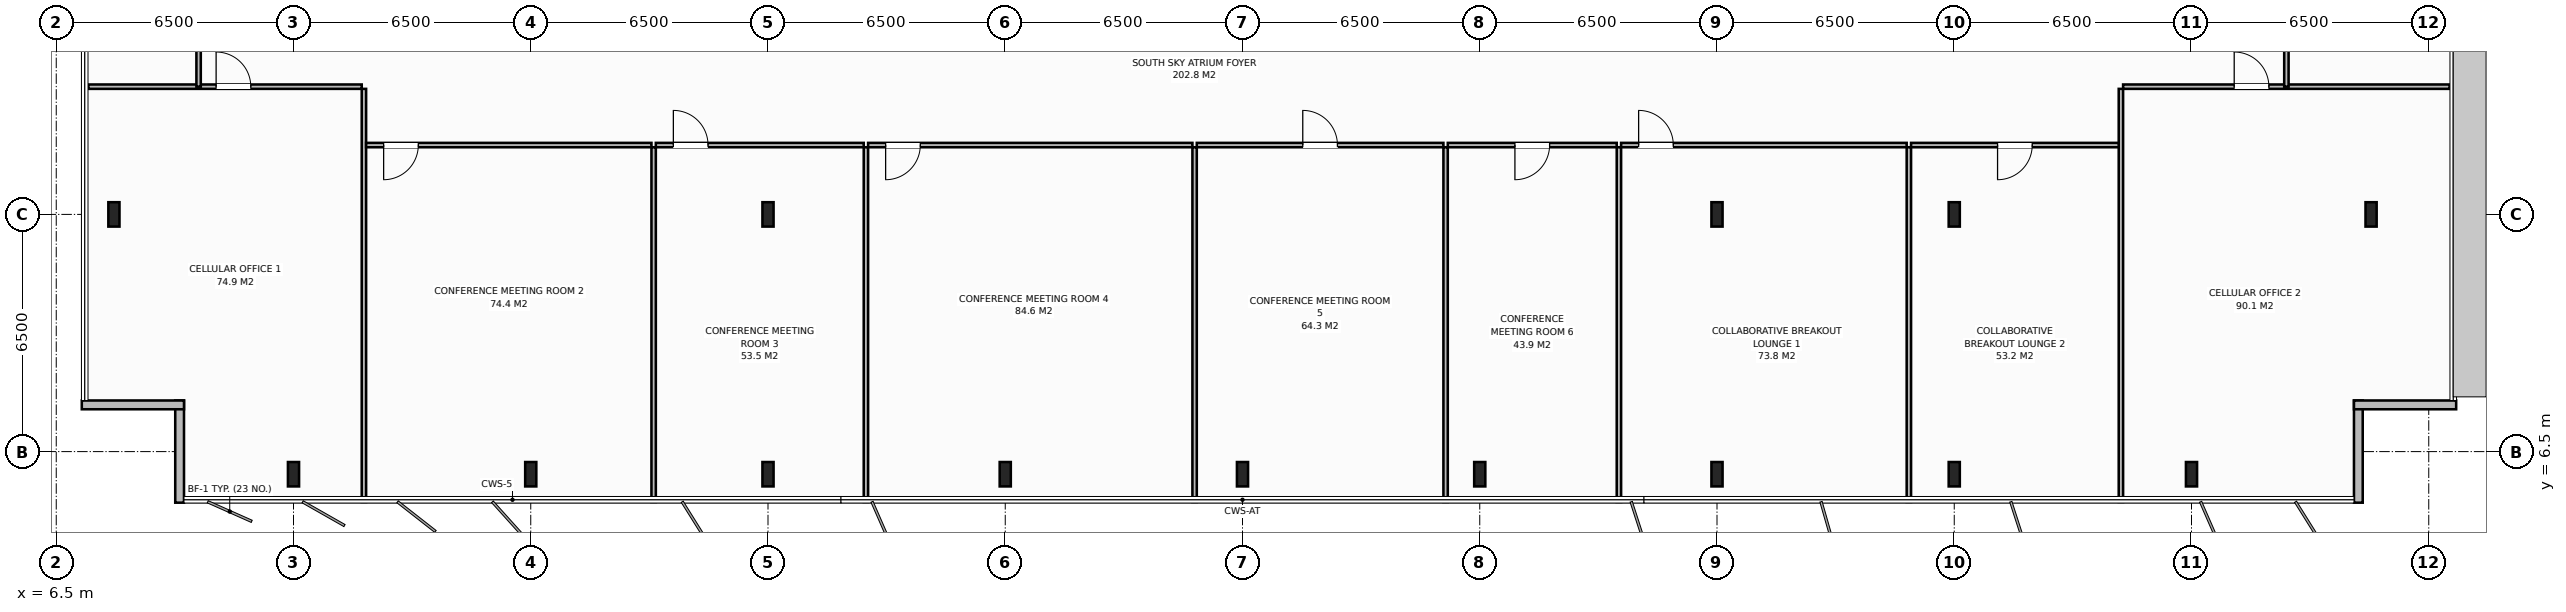
"""IFC4 building model, lengths in metres.
Left out: names, types, materials, properties, quantities, classifications, styles, units other than length and angle.
Written with IfcOpenShell. Run it as: python <this file> out.ifc"""

import sys

from ifc_helpers import new_model, si_unit, direction, frame, frame_2d, origin, origin_2d, place, context, subcontext, project, spatial, rectangle, i_section, extrude, element, fill, save


model = new_model("IFC4")
c1 = context("Model", 3, precision=1e-05, world=origin(), true_north=direction((0.0, 1.0)))
c2 = subcontext(c1, "Body", "Model", "MODEL_VIEW")
j1 = project(units=[si_unit("LENGTHUNIT", "METRE"), si_unit("PLANEANGLEUNIT", "RADIAN")], contexts=[c1])
p1 = place(None, origin())
s1 = spatial("IfcSite", under=j1, at=p1, CompositionType="ELEMENT")
p2 = place(p1, origin())
s2 = spatial("IfcBuilding", under=s1, at=p2, CompositionType="ELEMENT")
p3 = place(p2, frame((0.0, 0.0, 278.4)))
s3 = spatial("IfcBuildingStorey", under=s2, at=p3, CompositionType="ELEMENT", Elevation=278.4)
for number, where, z_axis, x_axis in (
    (1, (58.5, 13.0, 0.0), (0.0, 0.0, 1.0), (1.0, 0.0, 0.0)),
    (2, (26.0, 13.0, 0.0), (0.0, 0.0, 1.0), (1.0, 0.0, 0.0)),
    (3, (52.0, 13.0, 0.0), (0.0, 0.0, 1.0), (1.0, 0.0, 0.0)),
    (4, (13.0, 5.88, 0.0), (0.0, 0.0, 1.0), (1.0, 0.0, 0.0)),
    (5, (19.5, 5.88, 0.0), (0.0, 0.0, 1.0), (1.0, 0.0, 0.0)),
    (6, (26.0, 5.88, 0.0), (0.0, 0.0, 1.0), (1.0, 0.0, 0.0)),
    (7, (32.5, 5.88, 0.0), (0.0, 0.0, 1.0), (1.0, 0.0, 0.0)),
    (8, (39.0, 5.88, 0.0), (0.0, 0.0, 1.0), (1.0, 0.0, 0.0)),
    (9, (45.5, 5.88, 0.0), (0.0, 0.0, 1.0), (1.0, 0.0, 0.0)),
    (10, (52.0, 5.88, 0.0), (0.0, 0.0, 1.0), (1.0, 0.0, 0.0)),
    (11, (58.5, 5.88, 0.0), (0.0, 0.0, 1.0), (1.0, 0.0, 0.0)),
    (12, (65.0, 5.88, 0.0), (0.0, 0.0, 1.0), (1.0, 0.0, 0.0)),
    (13, (8.08, 13.0, 0.0), (0.0, 0.0, 1.0), (1.0, 0.0, 0.0)),
    (14, (69.92, 13.0, 0.0), (0.0, 0.0, 1.0), (1.0, 0.0, 0.0)),
):
    element("IfcColumn", number, at=place(p3, frame(where, z_axis=z_axis, x_axis=x_axis)), inside=s3, PredefinedType="COLUMN", context=c2, shape_type="SweptSolid", body=[
        extrude(i_section(OverallWidth=0.305, OverallDepth=0.668, WebThickness=0.021, FlangeThickness=0.04, at=origin_2d()), origin(), (0.0, 0.0, 1.0), 4.0),
    ])
p4 = place(p3, frame((9.88, 5.1, 0.0), z_axis=(0.0, 0.0, 1.0), x_axis=(0.0, 1.0, 0.0)))
e15 = element("IfcWall", 15, at=p4, inside=s3, PredefinedType="STANDARD", context=c2, shape_type="SweptSolid", body=[
    extrude(rectangle(XDim=2.8, YDim=0.24, at=frame_2d((1.4, 0.0))), origin(), (0.0, 0.0, 1.0), 3.788),
])
p5 = place(p3, frame((10.0, 7.78, 0.0), z_axis=(0.0, 0.0, 1.0), x_axis=(-1.0, 0.0, 0.0)))
e16 = element("IfcWall", 16, at=p5, inside=s3, PredefinedType="STANDARD", context=c2, shape_type="SweptSolid", body=[
    extrude(rectangle(XDim=2.8, YDim=0.24, at=frame_2d((1.4, 0.0))), origin(), (0.0, 0.0, 1.0), 3.788),
])
p6 = place(p3, frame((69.571, 7.9, 0.0), z_axis=(0.0, 0.0, 1.0), x_axis=(0.0, -1.0, 0.0)))
e17 = element("IfcWall", 17, at=p6, inside=s3, PredefinedType="STANDARD", context=c2, shape_type="SweptSolid", body=[
    extrude(rectangle(XDim=2.8, YDim=0.24, at=frame_2d((1.4, 0.0))), origin(), (0.0, 0.0, 1.0), 3.788),
])
p7 = place(p3, frame((72.251, 7.78, 0.0), z_axis=(0.0, 0.0, 1.0), x_axis=(-1.0, 0.0, 0.0)))
e18 = element("IfcWall", 18, at=p7, inside=s3, PredefinedType="STANDARD", context=c2, shape_type="SweptSolid", body=[
    extrude(rectangle(XDim=2.8, YDim=0.24, at=frame_2d((1.4, 0.0))), origin(), (0.0, 0.0, 1.0), 3.788),
])
p8 = place(p3, frame((14.929, 5.12, 0.0), z_axis=(0.0, 0.0, 1.0), x_axis=(0.0, 1.0, 0.0)))
e19 = element("IfcWall", 19, at=p8, inside=s3, PredefinedType="PARTITIONING", context=c2, shape_type="SweptSolid", body=[
    extrude(rectangle(XDim=11.32, YDim=0.12, at=frame_2d((5.66, 0.0))), origin(), (0.0, 0.0, 1.0), 3.788),
])
p9 = place(p3, frame((7.38, 16.5, 0.0), z_axis=(0.0, 0.0, 1.0), x_axis=(1.0, 0.0, 0.0)))
e20 = element("IfcWall", 20, at=p9, inside=s3, PredefinedType="PARTITIONING", context=c2, shape_type="SweptSolid", body=[
    extrude(rectangle(XDim=7.49, YDim=0.12, at=frame_2d((3.745, 0.0))), origin(), (0.0, 0.0, 1.0), 3.788),
])
p10 = place(p9, frame((3.5, 0.0, 0.0)))
e21 = element("IfcOpeningElement", 21, at=p10, cuts=e20, PredefinedType="OPENING", context=c2, shape_type="SweptSolid", body=[
    extrude(rectangle(XDim=0.95, YDim=2.15, at=frame_2d((0.475, 1.075))), frame((0.0, 0.07, 0.0), z_axis=(0.0, -1.0, 0.0), x_axis=(1.0, 0.0, 0.0)), (0.0, 0.0, 1.0), 0.14),
])
p11 = place(p3, frame((22.867, 5.12, 0.0), z_axis=(0.0, 0.0, 1.0), x_axis=(0.0, 1.0, 0.0)))
e22 = element("IfcWall", 22, at=p11, inside=s3, PredefinedType="PARTITIONING", context=c2, shape_type="SweptSolid", body=[
    extrude(rectangle(XDim=9.72, YDim=0.12, at=frame_2d((4.86, 0.0))), origin(), (0.0, 0.0, 1.0), 3.788),
])
p12 = place(p3, frame((14.99, 14.9, 0.0), z_axis=(0.0, 0.0, 1.0), x_axis=(1.0, 0.0, 0.0)))
e23 = element("IfcWall", 23, at=p12, inside=s3, PredefinedType="PARTITIONING", context=c2, shape_type="SweptSolid", body=[
    extrude(rectangle(XDim=7.817, YDim=0.12, at=frame_2d((3.909, 0.0))), origin(), (0.0, 0.0, 1.0), 3.788),
])
p13 = place(p12, frame((0.48, 0.0, 0.0)))
e24 = element("IfcOpeningElement", 24, at=p13, cuts=e23, PredefinedType="OPENING", context=c2, shape_type="SweptSolid", body=[
    extrude(rectangle(XDim=0.95, YDim=2.15, at=frame_2d((0.475, 1.075))), frame((0.0, 0.07, 0.0), z_axis=(0.0, -1.0, 0.0), x_axis=(1.0, 0.0, 0.0)), (0.0, 0.0, 1.0), 0.14),
])
p14 = place(p3, frame((28.683, 5.12, 0.0), z_axis=(0.0, 0.0, 1.0), x_axis=(0.0, 1.0, 0.0)))
e25 = element("IfcWall", 25, at=p14, inside=s3, PredefinedType="PARTITIONING", context=c2, shape_type="SweptSolid", body=[
    extrude(rectangle(XDim=9.72, YDim=0.12, at=frame_2d((4.86, 0.0))), origin(), (0.0, 0.0, 1.0), 3.788),
])
p15 = place(p3, frame((22.927, 14.9, 0.0), z_axis=(0.0, 0.0, 1.0), x_axis=(1.0, 0.0, 0.0)))
e26 = element("IfcWall", 26, at=p15, inside=s3, PredefinedType="PARTITIONING", context=c2, shape_type="SweptSolid", body=[
    extrude(rectangle(XDim=5.696, YDim=0.12, at=frame_2d((2.848, 0.0))), origin(), (0.0, 0.0, 1.0), 3.788),
])
p16 = place(p15, frame((0.48, 0.0, 0.0)))
e27 = element("IfcOpeningElement", 27, at=p16, cuts=e26, PredefinedType="OPENING", context=c2, shape_type="SweptSolid", body=[
    extrude(rectangle(XDim=0.95, YDim=2.15, at=frame_2d((0.475, 1.075))), frame((0.0, 0.07, 0.0), z_axis=(0.0, -1.0, 0.0), x_axis=(1.0, 0.0, 0.0)), (0.0, 0.0, 1.0), 0.14),
])
p17 = place(p3, frame((37.688, 5.12, 0.0), z_axis=(0.0, 0.0, 1.0), x_axis=(0.0, 1.0, 0.0)))
e28 = element("IfcWall", 28, at=p17, inside=s3, PredefinedType="PARTITIONING", context=c2, shape_type="SweptSolid", body=[
    extrude(rectangle(XDim=9.72, YDim=0.12, at=frame_2d((4.86, 0.0))), origin(), (0.0, 0.0, 1.0), 3.788),
])
p18 = place(p3, frame((28.743, 14.9, 0.0), z_axis=(0.0, 0.0, 1.0), x_axis=(1.0, 0.0, 0.0)))
e29 = element("IfcWall", 29, at=p18, inside=s3, PredefinedType="PARTITIONING", context=c2, shape_type="SweptSolid", body=[
    extrude(rectangle(XDim=8.885, YDim=0.12, at=frame_2d((4.442, 0.0))), origin(), (0.0, 0.0, 1.0), 3.788),
])
p19 = place(p18, frame((0.48, 0.0, 0.0)))
e30 = element("IfcOpeningElement", 30, at=p19, cuts=e29, PredefinedType="OPENING", context=c2, shape_type="SweptSolid", body=[
    extrude(rectangle(XDim=0.95, YDim=2.15, at=frame_2d((0.475, 1.075))), frame((0.0, 0.07, 0.0), z_axis=(0.0, -1.0, 0.0), x_axis=(1.0, 0.0, 0.0)), (0.0, 0.0, 1.0), 0.14),
])
p20 = place(p3, frame((44.564, 5.12, 0.0), z_axis=(0.0, 0.0, 1.0), x_axis=(0.0, 1.0, 0.0)))
e31 = element("IfcWall", 31, at=p20, inside=s3, PredefinedType="PARTITIONING", context=c2, shape_type="SweptSolid", body=[
    extrude(rectangle(XDim=9.72, YDim=0.12, at=frame_2d((4.86, 0.0))), origin(), (0.0, 0.0, 1.0), 3.788),
])
p21 = place(p3, frame((37.748, 14.9, 0.0), z_axis=(0.0, 0.0, 1.0), x_axis=(1.0, 0.0, 0.0)))
e32 = element("IfcWall", 32, at=p21, inside=s3, PredefinedType="PARTITIONING", context=c2, shape_type="SweptSolid", body=[
    extrude(rectangle(XDim=6.757, YDim=0.12, at=frame_2d((3.378, 0.0))), origin(), (0.0, 0.0, 1.0), 3.788),
])
p22 = place(p21, frame((2.903, 0.0, 0.0)))
e33 = element("IfcOpeningElement", 33, at=p22, cuts=e32, PredefinedType="OPENING", context=c2, shape_type="SweptSolid", body=[
    extrude(rectangle(XDim=0.95, YDim=2.15, at=frame_2d((0.475, 1.075))), frame((0.0, 0.07, 0.0), z_axis=(0.0, -1.0, 0.0), x_axis=(1.0, 0.0, 0.0)), (0.0, 0.0, 1.0), 0.14),
])
p23 = place(p3, frame((49.313, 5.12, 0.0), z_axis=(0.0, 0.0, 1.0), x_axis=(0.0, 1.0, 0.0)))
e34 = element("IfcWall", 34, at=p23, inside=s3, PredefinedType="PARTITIONING", context=c2, shape_type="SweptSolid", body=[
    extrude(rectangle(XDim=9.72, YDim=0.12, at=frame_2d((4.86, 0.0))), origin(), (0.0, 0.0, 1.0), 3.788),
])
p24 = place(p3, frame((44.625, 14.9, 0.0), z_axis=(0.0, 0.0, 1.0), x_axis=(1.0, 0.0, 0.0)))
e35 = element("IfcWall", 35, at=p24, inside=s3, PredefinedType="PARTITIONING", context=c2, shape_type="SweptSolid", body=[
    extrude(rectangle(XDim=4.628, YDim=0.12, at=frame_2d((2.314, 0.0))), origin(), (0.0, 0.0, 1.0), 3.788),
])
p25 = place(p24, frame((1.839, 0.0, 0.0)))
e36 = element("IfcOpeningElement", 36, at=p25, cuts=e35, PredefinedType="OPENING", context=c2, shape_type="SweptSolid", body=[
    extrude(rectangle(XDim=0.95, YDim=2.15, at=frame_2d((0.475, 1.075))), frame((0.0, 0.07, 0.0), z_axis=(0.0, -1.0, 0.0), x_axis=(1.0, 0.0, 0.0)), (0.0, 0.0, 1.0), 0.14),
])
p26 = place(p3, frame((57.257, 5.12, 0.0), z_axis=(0.0, 0.0, 1.0), x_axis=(0.0, 1.0, 0.0)))
e37 = element("IfcWall", 37, at=p26, inside=s3, PredefinedType="PARTITIONING", context=c2, shape_type="SweptSolid", body=[
    extrude(rectangle(XDim=9.72, YDim=0.12, at=frame_2d((4.86, 0.0))), origin(), (0.0, 0.0, 1.0), 3.788),
])
p27 = place(p3, frame((49.373, 14.9, 0.0), z_axis=(0.0, 0.0, 1.0), x_axis=(1.0, 0.0, 0.0)))
e38 = element("IfcWall", 38, at=p27, inside=s3, PredefinedType="PARTITIONING", context=c2, shape_type="SweptSolid", body=[
    extrude(rectangle(XDim=7.824, YDim=0.12, at=frame_2d((3.912, 0.0))), origin(), (0.0, 0.0, 1.0), 3.788),
])
p28 = place(p27, frame((0.48, 0.0, 0.0)))
e39 = element("IfcOpeningElement", 39, at=p28, cuts=e38, PredefinedType="OPENING", context=c2, shape_type="SweptSolid", body=[
    extrude(rectangle(XDim=0.95, YDim=2.15, at=frame_2d((0.475, 1.075))), frame((0.0, 0.07, 0.0), z_axis=(0.0, -1.0, 0.0), x_axis=(1.0, 0.0, 0.0)), (0.0, 0.0, 1.0), 0.14),
])
p29 = place(p3, frame((63.066, 5.12, 0.0), z_axis=(0.0, 0.0, 1.0), x_axis=(0.0, 1.0, 0.0)))
e40 = element("IfcWall", 40, at=p29, inside=s3, PredefinedType="PARTITIONING", context=c2, shape_type="SweptSolid", body=[
    extrude(rectangle(XDim=11.32, YDim=0.12, at=frame_2d((5.66, 0.0))), origin(), (0.0, 0.0, 1.0), 3.788),
])
p30 = place(p3, frame((57.317, 14.9, 0.0), z_axis=(0.0, 0.0, 1.0), x_axis=(1.0, 0.0, 0.0)))
e41 = element("IfcWall", 41, at=p30, inside=s3, PredefinedType="PARTITIONING", context=c2, shape_type="SweptSolid", body=[
    extrude(rectangle(XDim=5.689, YDim=0.12, at=frame_2d((2.845, 0.0))), origin(), (0.0, 0.0, 1.0), 3.788),
])
p31 = place(p30, frame((2.37, 0.0, 0.0)))
e42 = element("IfcOpeningElement", 42, at=p31, cuts=e41, PredefinedType="OPENING", context=c2, shape_type="SweptSolid", body=[
    extrude(rectangle(XDim=0.95, YDim=2.15, at=frame_2d((0.475, 1.075))), frame((0.0, 0.07, 0.0), z_axis=(0.0, -1.0, 0.0), x_axis=(1.0, 0.0, 0.0)), (0.0, 0.0, 1.0), 0.14),
])
p32 = place(p3, frame((63.126, 16.5, 0.0), z_axis=(0.0, 0.0, 1.0), x_axis=(1.0, 0.0, 0.0)))
e43 = element("IfcWall", 43, at=p32, inside=s3, PredefinedType="PARTITIONING", context=c2, shape_type="SweptSolid", body=[
    extrude(rectangle(XDim=8.945, YDim=0.12, at=frame_2d((4.472, 0.0))), origin(), (0.0, 0.0, 1.0), 3.788),
])
p33 = place(p32, frame((3.044, 0.0, 0.0)))
e44 = element("IfcOpeningElement", 44, at=p33, cuts=e43, PredefinedType="OPENING", context=c2, shape_type="SweptSolid", body=[
    extrude(rectangle(XDim=0.95, YDim=2.15, at=frame_2d((0.475, 1.075))), frame((0.0, 0.07, 0.0), z_axis=(0.0, -1.0, 0.0), x_axis=(1.0, 0.0, 0.0)), (0.0, 0.0, 1.0), 0.14),
])
p34 = place(p3, frame((10.4, 16.5, 0.0), z_axis=(0.0, 0.0, 1.0), x_axis=(0.0, 1.0, 0.0)))
e45 = element("IfcWall", 45, at=p34, inside=s3, PredefinedType="PARTITIONING", context=c2, shape_type="SweptSolid", body=[
    extrude(rectangle(XDim=9.5, YDim=0.12, at=frame_2d((4.75, 0.0))), origin(), (0.0, 0.0, 1.0), 3.788),
])
p35 = place(p34, frame((5.325, 0.0, 0.0)))
e46 = element("IfcOpeningElement", 46, at=p35, cuts=e45, PredefinedType="OPENING", context=c2, shape_type="SweptSolid", body=[
    extrude(rectangle(XDim=0.95, YDim=2.15, at=frame_2d((0.475, 1.075))), frame((0.0, 0.07, 0.0), z_axis=(0.0, -1.0, 0.0), x_axis=(1.0, 0.0, 0.0)), (0.0, 0.0, 1.0), 0.14),
])
p36 = place(p3, frame((67.6, 16.5, 0.0), z_axis=(0.0, 0.0, 1.0), x_axis=(0.0, 1.0, 0.0)))
e47 = element("IfcWall", 47, at=p36, inside=s3, PredefinedType="PARTITIONING", context=c2, shape_type="SweptSolid", body=[
    extrude(rectangle(XDim=19.0, YDim=0.12, at=frame_2d((9.5, 0.0))), origin(), (0.0, 0.0, 1.0), 3.788),
])
p37 = place(p36, frame((9.025, 0.0, 0.0)))
e48 = element("IfcOpeningElement", 48, at=p37, cuts=e47, PredefinedType="OPENING", context=c2, shape_type="SweptSolid", body=[
    extrude(rectangle(XDim=0.95, YDim=2.15, at=frame_2d((0.475, 1.075))), frame((0.0, 0.07, 0.0), z_axis=(0.0, -1.0, 0.0), x_axis=(1.0, 0.0, 0.0)), (0.0, 0.0, 1.0), 0.14),
])
p38 = place(p10, origin())
e49 = element("IfcDoor", 49, at=p38, inside=s3, OperationType="SINGLE_SWING_LEFT", PredefinedType="DOOR", context=c2, shape_type="SweptSolid", body=[
    extrude(rectangle(XDim=0.95, YDim=2.15, at=frame_2d((0.475, 1.075))), frame((0.0, 0.025, 0.0), z_axis=(0.0, -1.0, 0.0), x_axis=(1.0, 0.0, 0.0)), (0.0, 0.0, 1.0), 0.05),
])
fill(e21, e49)
p39 = place(p13, origin())
e50 = element("IfcDoor", 50, at=p39, inside=s3, OperationType="SINGLE_SWING_RIGHT", PredefinedType="DOOR", context=c2, shape_type="SweptSolid", body=[
    extrude(rectangle(XDim=0.95, YDim=2.15, at=frame_2d((0.475, 1.075))), frame((0.0, 0.025, 0.0), z_axis=(0.0, -1.0, 0.0), x_axis=(1.0, 0.0, 0.0)), (0.0, 0.0, 1.0), 0.05),
])
fill(e24, e50)
p40 = place(p16, origin())
e51 = element("IfcDoor", 51, at=p40, inside=s3, OperationType="SINGLE_SWING_LEFT", PredefinedType="DOOR", context=c2, shape_type="SweptSolid", body=[
    extrude(rectangle(XDim=0.95, YDim=2.15, at=frame_2d((0.475, 1.075))), frame((0.0, 0.025, 0.0), z_axis=(0.0, -1.0, 0.0), x_axis=(1.0, 0.0, 0.0)), (0.0, 0.0, 1.0), 0.05),
])
fill(e27, e51)
p41 = place(p19, origin())
e52 = element("IfcDoor", 52, at=p41, inside=s3, OperationType="SINGLE_SWING_RIGHT", PredefinedType="DOOR", context=c2, shape_type="SweptSolid", body=[
    extrude(rectangle(XDim=0.95, YDim=2.15, at=frame_2d((0.475, 1.075))), frame((0.0, 0.025, 0.0), z_axis=(0.0, -1.0, 0.0), x_axis=(1.0, 0.0, 0.0)), (0.0, 0.0, 1.0), 0.05),
])
fill(e30, e52)
p42 = place(p22, origin())
e53 = element("IfcDoor", 53, at=p42, inside=s3, OperationType="SINGLE_SWING_LEFT", PredefinedType="DOOR", context=c2, shape_type="SweptSolid", body=[
    extrude(rectangle(XDim=0.95, YDim=2.15, at=frame_2d((0.475, 1.075))), frame((0.0, 0.025, 0.0), z_axis=(0.0, -1.0, 0.0), x_axis=(1.0, 0.0, 0.0)), (0.0, 0.0, 1.0), 0.05),
])
fill(e33, e53)
p43 = place(p25, origin())
e54 = element("IfcDoor", 54, at=p43, inside=s3, OperationType="SINGLE_SWING_RIGHT", PredefinedType="DOOR", context=c2, shape_type="SweptSolid", body=[
    extrude(rectangle(XDim=0.95, YDim=2.15, at=frame_2d((0.475, 1.075))), frame((0.0, 0.025, 0.0), z_axis=(0.0, -1.0, 0.0), x_axis=(1.0, 0.0, 0.0)), (0.0, 0.0, 1.0), 0.05),
])
fill(e36, e54)
p44 = place(p28, origin())
e55 = element("IfcDoor", 55, at=p44, inside=s3, OperationType="SINGLE_SWING_LEFT", PredefinedType="DOOR", context=c2, shape_type="SweptSolid", body=[
    extrude(rectangle(XDim=0.95, YDim=2.15, at=frame_2d((0.475, 1.075))), frame((0.0, 0.025, 0.0), z_axis=(0.0, -1.0, 0.0), x_axis=(1.0, 0.0, 0.0)), (0.0, 0.0, 1.0), 0.05),
])
fill(e39, e55)
p45 = place(p31, origin())
e56 = element("IfcDoor", 56, at=p45, inside=s3, OperationType="SINGLE_SWING_RIGHT", PredefinedType="DOOR", context=c2, shape_type="SweptSolid", body=[
    extrude(rectangle(XDim=0.95, YDim=2.15, at=frame_2d((0.475, 1.075))), frame((0.0, 0.025, 0.0), z_axis=(0.0, -1.0, 0.0), x_axis=(1.0, 0.0, 0.0)), (0.0, 0.0, 1.0), 0.05),
])
fill(e42, e56)
p46 = place(p33, origin())
e57 = element("IfcDoor", 57, at=p46, inside=s3, OperationType="SINGLE_SWING_LEFT", PredefinedType="DOOR", context=c2, shape_type="SweptSolid", body=[
    extrude(rectangle(XDim=0.95, YDim=2.15, at=frame_2d((0.475, 1.075))), frame((0.0, 0.025, 0.0), z_axis=(0.0, -1.0, 0.0), x_axis=(1.0, 0.0, 0.0)), (0.0, 0.0, 1.0), 0.05),
])
fill(e44, e57)
save(model, sys.argv[1])
